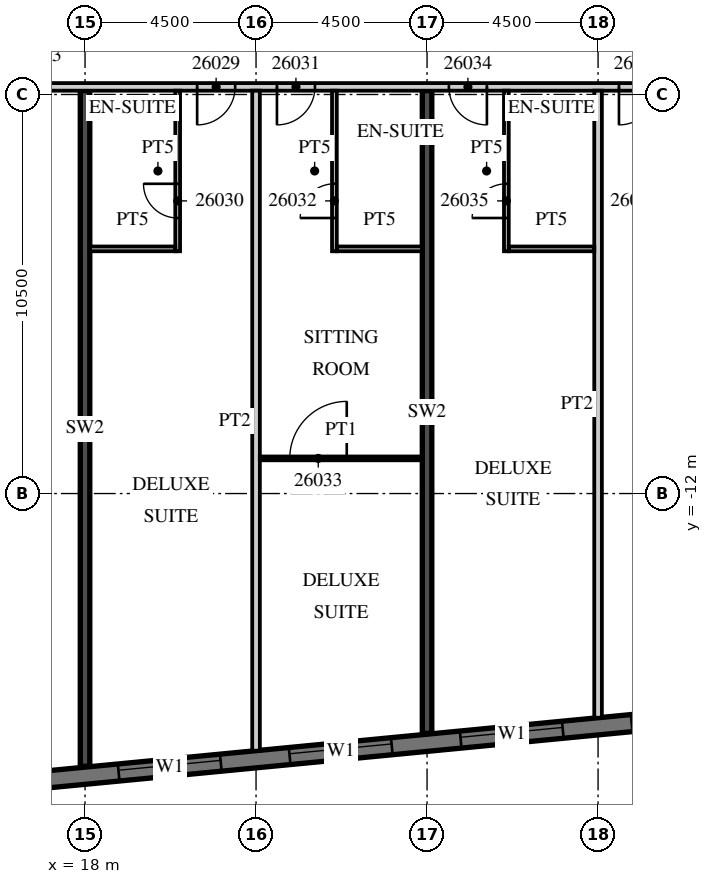
"""IFC4 building model, lengths in metres.
Left out: names, types, materials, properties, quantities, classifications, styles, units other than length and angle.
Written with IfcOpenShell. Run it as: python <this file> out.ifc"""

import sys

from ifc_helpers import new_model, si_unit, direction, frame, frame_2d, origin, place, context, subcontext, project, spatial, rectangle, extrude, element, fill, save


model = new_model("IFC4")
c1 = context("Model", 3, precision=1e-05, world=origin(), true_north=direction((0.0, 1.0)))
c2 = subcontext(c1, "Body", "Model", "MODEL_VIEW")
j1 = project(units=[si_unit("LENGTHUNIT", "METRE"), si_unit("PLANEANGLEUNIT", "RADIAN")], contexts=[c1])
p1 = place(None, origin())
s1 = spatial("IfcSite", under=j1, at=p1, CompositionType="ELEMENT")
p2 = place(p1, origin())
s2 = spatial("IfcBuilding", under=s1, at=p2, CompositionType="ELEMENT")
p3 = place(p2, frame((0.0, 0.0, 120.7)))
s3 = spatial("IfcBuildingStorey", under=s2, at=p3, CompositionType="ELEMENT", Elevation=120.7)
p4 = place(p3, frame((18.0, -19.177, 0.0), z_axis=(0.0, 0.0, 1.0), x_axis=(0.0, 1.0, 0.0)))
e1 = element("IfcWall", 1, at=p4, inside=s3, PredefinedType="SHEAR", context=c2, shape_type="SweptSolid", body=[
    extrude(rectangle(XDim=17.777, YDim=0.25, at=frame_2d((8.889, 0.0))), origin(), (0.0, 0.0, 1.0), 3.3),
])
p5 = place(p3, frame((27.0, -18.311, 0.0), z_axis=(0.0, 0.0, 1.0), x_axis=(0.0, 1.0, 0.0)))
e2 = element("IfcWall", 2, at=p5, inside=s3, PredefinedType="SHEAR", context=c2, shape_type="SweptSolid", body=[
    extrude(rectangle(XDim=16.911, YDim=0.25, at=frame_2d((8.455, 0.0))), origin(), (0.0, 0.0, 1.0), 3.3),
])
p6 = place(p3, frame((-13.521, -22.46, 0.0), z_axis=(0.0, 0.0, 1.0), x_axis=(0.995396096335, 0.095846812164, 0.0)))
e3 = element("IfcWall", 3, at=p6, inside=s3, PredefinedType="SOLIDWALL", context=c2, shape_type="SweptSolid", body=[
    extrude(rectangle(XDim=59.151, YDim=0.45, at=frame_2d((29.575, 0.0))), origin(), (0.0, 0.0, 1.0), 3.02),
])
p7 = place(p6, frame((0.91, 0.0, 0.45)))
e4 = element("IfcOpeningElement", 4, at=p7, cuts=e3, PredefinedType="OPENING", context=c2, shape_type="SweptSolid", body=[
    extrude(rectangle(XDim=2.7, YDim=2.25, at=frame_2d((1.35, 1.125))), frame((0.0, 0.235, 0.0), z_axis=(0.0, -1.0, 0.0), x_axis=(1.0, 0.0, 0.0)), (0.0, 0.0, 1.0), 0.47),
])
p8 = place(p6, frame((5.431, 0.0, 0.45)))
e5 = element("IfcOpeningElement", 5, at=p8, cuts=e3, PredefinedType="OPENING", context=c2, shape_type="SweptSolid", body=[
    extrude(rectangle(XDim=2.7, YDim=2.25, at=frame_2d((1.35, 1.125))), frame((0.0, 0.235, 0.0), z_axis=(0.0, -1.0, 0.0), x_axis=(1.0, 0.0, 0.0)), (0.0, 0.0, 1.0), 0.47),
])
p9 = place(p6, frame((9.952, 0.0, 0.45)))
e6 = element("IfcOpeningElement", 6, at=p9, cuts=e3, PredefinedType="OPENING", context=c2, shape_type="SweptSolid", body=[
    extrude(rectangle(XDim=2.7, YDim=2.25, at=frame_2d((1.35, 1.125))), frame((0.0, 0.235, 0.0), z_axis=(0.0, -1.0, 0.0), x_axis=(1.0, 0.0, 0.0)), (0.0, 0.0, 1.0), 0.47),
])
p10 = place(p6, frame((14.473, 0.0, 0.45)))
e7 = element("IfcOpeningElement", 7, at=p10, cuts=e3, PredefinedType="OPENING", context=c2, shape_type="SweptSolid", body=[
    extrude(rectangle(XDim=2.7, YDim=2.25, at=frame_2d((1.35, 1.125))), frame((0.0, 0.235, 0.0), z_axis=(0.0, -1.0, 0.0), x_axis=(1.0, 0.0, 0.0)), (0.0, 0.0, 1.0), 0.47),
])
p11 = place(p6, frame((18.994, 0.0, 0.45)))
e8 = element("IfcOpeningElement", 8, at=p11, cuts=e3, PredefinedType="OPENING", context=c2, shape_type="SweptSolid", body=[
    extrude(rectangle(XDim=2.7, YDim=2.25, at=frame_2d((1.35, 1.125))), frame((0.0, 0.235, 0.0), z_axis=(0.0, -1.0, 0.0), x_axis=(1.0, 0.0, 0.0)), (0.0, 0.0, 1.0), 0.47),
])
p12 = place(p6, frame((23.514, 0.0, 0.45)))
e9 = element("IfcOpeningElement", 9, at=p12, cuts=e3, PredefinedType="OPENING", context=c2, shape_type="SweptSolid", body=[
    extrude(rectangle(XDim=2.7, YDim=2.25, at=frame_2d((1.35, 1.125))), frame((0.0, 0.235, 0.0), z_axis=(0.0, -1.0, 0.0), x_axis=(1.0, 0.0, 0.0)), (0.0, 0.0, 1.0), 0.47),
])
p13 = place(p6, frame((28.035, 0.0, 0.45)))
e10 = element("IfcOpeningElement", 10, at=p13, cuts=e3, PredefinedType="OPENING", context=c2, shape_type="SweptSolid", body=[
    extrude(rectangle(XDim=2.7, YDim=2.25, at=frame_2d((1.35, 1.125))), frame((0.0, 0.235, 0.0), z_axis=(0.0, -1.0, 0.0), x_axis=(1.0, 0.0, 0.0)), (0.0, 0.0, 1.0), 0.47),
])
p14 = place(p6, frame((32.556, 0.0, 0.45)))
e11 = element("IfcOpeningElement", 11, at=p14, cuts=e3, PredefinedType="OPENING", context=c2, shape_type="SweptSolid", body=[
    extrude(rectangle(XDim=2.7, YDim=2.25, at=frame_2d((1.35, 1.125))), frame((0.0, 0.235, 0.0), z_axis=(0.0, -1.0, 0.0), x_axis=(1.0, 0.0, 0.0)), (0.0, 0.0, 1.0), 0.47),
])
p15 = place(p6, frame((37.077, 0.0, 0.45)))
e12 = element("IfcOpeningElement", 12, at=p15, cuts=e3, PredefinedType="OPENING", context=c2, shape_type="SweptSolid", body=[
    extrude(rectangle(XDim=2.7, YDim=2.25, at=frame_2d((1.35, 1.125))), frame((0.0, 0.235, 0.0), z_axis=(0.0, -1.0, 0.0), x_axis=(1.0, 0.0, 0.0)), (0.0, 0.0, 1.0), 0.47),
])
p16 = place(p6, frame((41.598, 0.0, 0.45)))
e13 = element("IfcOpeningElement", 13, at=p16, cuts=e3, PredefinedType="OPENING", context=c2, shape_type="SweptSolid", body=[
    extrude(rectangle(XDim=2.7, YDim=2.25, at=frame_2d((1.35, 1.125))), frame((0.0, 0.235, 0.0), z_axis=(0.0, -1.0, 0.0), x_axis=(1.0, 0.0, 0.0)), (0.0, 0.0, 1.0), 0.47),
])
p17 = place(p6, frame((46.118, 0.0, 0.45)))
e14 = element("IfcOpeningElement", 14, at=p17, cuts=e3, PredefinedType="OPENING", context=c2, shape_type="SweptSolid", body=[
    extrude(rectangle(XDim=2.7, YDim=2.25, at=frame_2d((1.35, 1.125))), frame((0.0, 0.235, 0.0), z_axis=(0.0, -1.0, 0.0), x_axis=(1.0, 0.0, 0.0)), (0.0, 0.0, 1.0), 0.47),
])
p18 = place(p6, frame((50.639, 0.0, 0.45)))
e15 = element("IfcOpeningElement", 15, at=p18, cuts=e3, PredefinedType="OPENING", context=c2, shape_type="SweptSolid", body=[
    extrude(rectangle(XDim=2.7, YDim=2.25, at=frame_2d((1.35, 1.125))), frame((0.0, 0.235, 0.0), z_axis=(0.0, -1.0, 0.0), x_axis=(1.0, 0.0, 0.0)), (0.0, 0.0, 1.0), 0.47),
])
p19 = place(p6, frame((55.15, 0.0, 0.45)))
e16 = element("IfcOpeningElement", 16, at=p19, cuts=e3, PredefinedType="OPENING", context=c2, shape_type="SweptSolid", body=[
    extrude(rectangle(XDim=2.7, YDim=2.25, at=frame_2d((1.35, 1.125))), frame((0.0, 0.235, 0.0), z_axis=(0.0, -1.0, 0.0), x_axis=(1.0, 0.0, 0.0)), (0.0, 0.0, 1.0), 0.47),
])
p20 = place(p3, frame((-13.5, -1.3, 0.0), z_axis=(0.0, 0.0, 1.0), x_axis=(1.0, 0.0, 0.0)))
e17 = element("IfcWall", 17, at=p20, inside=s3, PredefinedType="PARTITIONING", context=c2, shape_type="SweptSolid", body=[
    extrude(rectangle(XDim=60.932, YDim=0.2, at=frame_2d((30.466, 0.0))), origin(), (0.0, 0.0, 1.0), 3.02),
])
p21 = place(p20, frame((2.925, 0.0, 0.0)))
e18 = element("IfcOpeningElement", 18, at=p21, cuts=e17, PredefinedType="OPENING", context=c2, shape_type="SweptSolid", body=[
    extrude(rectangle(XDim=1.0, YDim=2.1, at=frame_2d((0.5, 1.05))), frame((0.0, 0.11, 0.0), z_axis=(0.0, -1.0, 0.0), x_axis=(1.0, 0.0, 0.0)), (0.0, 0.0, 1.0), 0.22),
])
p22 = place(p20, frame((9.863, 0.0, 0.0)))
e19 = element("IfcOpeningElement", 19, at=p22, cuts=e17, PredefinedType="OPENING", context=c2, shape_type="SweptSolid", body=[
    extrude(rectangle(XDim=1.2, YDim=2.1, at=frame_2d((0.6, 1.05))), frame((0.0, 0.11, 0.0), z_axis=(0.0, -1.0, 0.0), x_axis=(1.0, 0.0, 0.0)), (0.0, 0.0, 1.0), 0.22),
])
p23 = place(p20, frame((15.938, 0.0, 0.0)))
e20 = element("IfcOpeningElement", 20, at=p23, cuts=e17, PredefinedType="OPENING", context=c2, shape_type="SweptSolid", body=[
    extrude(rectangle(XDim=1.2, YDim=2.1, at=frame_2d((0.6, 1.05))), frame((0.0, 0.11, 0.0), z_axis=(0.0, -1.0, 0.0), x_axis=(1.0, 0.0, 0.0)), (0.0, 0.0, 1.0), 0.22),
])
p24 = place(p20, frame((27.862, 0.0, 0.0)))
e21 = element("IfcOpeningElement", 21, at=p24, cuts=e17, PredefinedType="OPENING", context=c2, shape_type="SweptSolid", body=[
    extrude(rectangle(XDim=1.2, YDim=2.1, at=frame_2d((0.6, 1.05))), frame((0.0, 0.11, 0.0), z_axis=(0.0, -1.0, 0.0), x_axis=(1.0, 0.0, 0.0)), (0.0, 0.0, 1.0), 0.22),
])
p25 = place(p20, frame((34.45, 0.0, 0.0)))
e22 = element("IfcOpeningElement", 22, at=p25, cuts=e17, PredefinedType="OPENING", context=c2, shape_type="SweptSolid", body=[
    extrude(rectangle(XDim=1.0, YDim=2.1, at=frame_2d((0.5, 1.05))), frame((0.0, 0.11, 0.0), z_axis=(0.0, -1.0, 0.0), x_axis=(1.0, 0.0, 0.0)), (0.0, 0.0, 1.0), 0.22),
])
p26 = place(p20, frame((36.55, 0.0, 0.0)))
e23 = element("IfcOpeningElement", 23, at=p26, cuts=e17, PredefinedType="OPENING", context=c2, shape_type="SweptSolid", body=[
    extrude(rectangle(XDim=1.0, YDim=2.1, at=frame_2d((0.5, 1.05))), frame((0.0, 0.11, 0.0), z_axis=(0.0, -1.0, 0.0), x_axis=(1.0, 0.0, 0.0)), (0.0, 0.0, 1.0), 0.22),
])
p27 = place(p20, frame((41.075, 0.0, 0.0)))
e24 = element("IfcOpeningElement", 24, at=p27, cuts=e17, PredefinedType="OPENING", context=c2, shape_type="SweptSolid", body=[
    extrude(rectangle(XDim=1.0, YDim=2.1, at=frame_2d((0.5, 1.05))), frame((0.0, 0.11, 0.0), z_axis=(0.0, -1.0, 0.0), x_axis=(1.0, 0.0, 0.0)), (0.0, 0.0, 1.0), 0.22),
])
p28 = place(p20, frame((45.55, 0.0, 0.0)))
e25 = element("IfcOpeningElement", 25, at=p28, cuts=e17, PredefinedType="OPENING", context=c2, shape_type="SweptSolid", body=[
    extrude(rectangle(XDim=1.0, YDim=2.1, at=frame_2d((0.5, 1.05))), frame((0.0, 0.11, 0.0), z_axis=(0.0, -1.0, 0.0), x_axis=(1.0, 0.0, 0.0)), (0.0, 0.0, 1.0), 0.22),
])
p29 = place(p20, frame((50.075, 0.0, 0.0)))
e26 = element("IfcOpeningElement", 26, at=p29, cuts=e17, PredefinedType="OPENING", context=c2, shape_type="SweptSolid", body=[
    extrude(rectangle(XDim=1.0, YDim=2.1, at=frame_2d((0.5, 1.05))), frame((0.0, 0.11, 0.0), z_axis=(0.0, -1.0, 0.0), x_axis=(1.0, 0.0, 0.0)), (0.0, 0.0, 1.0), 0.22),
])
p30 = place(p20, frame((54.575, 0.0, 0.0)))
e27 = element("IfcOpeningElement", 27, at=p30, cuts=e17, PredefinedType="OPENING", context=c2, shape_type="SweptSolid", body=[
    extrude(rectangle(XDim=1.0, YDim=2.1, at=frame_2d((0.5, 1.05))), frame((0.0, 0.11, 0.0), z_axis=(0.0, -1.0, 0.0), x_axis=(1.0, 0.0, 0.0)), (0.0, 0.0, 1.0), 0.22),
])
p31 = place(p20, frame((59.882, 0.0, 0.0)))
e28 = element("IfcOpeningElement", 28, at=p31, cuts=e17, PredefinedType="OPENING", context=c2, shape_type="SweptSolid", body=[
    extrude(rectangle(XDim=0.9, YDim=2.1, at=frame_2d((0.45, 1.05))), frame((0.0, 0.11, 0.0), z_axis=(0.0, -1.0, 0.0), x_axis=(1.0, 0.0, 0.0)), (0.0, 0.0, 1.0), 0.22),
])
p32 = place(p3, frame((22.5, -18.766, 0.0), z_axis=(0.0, 0.0, 1.0), x_axis=(0.0, 1.0, 0.0)))
e29 = element("IfcWall", 29, at=p32, inside=s3, PredefinedType="PARTITIONING", context=c2, shape_type="SweptSolid", body=[
    extrude(rectangle(XDim=17.366, YDim=0.2, at=frame_2d((8.683, 0.0))), origin(), (0.0, 0.0, 1.0), 3.02),
])
p33 = place(p3, frame((20.438, -5.625, 0.0), z_axis=(0.0, 0.0, 1.0), x_axis=(0.0, 1.0, 0.0)))
e30 = element("IfcWall", 30, at=p33, inside=s3, PredefinedType="PARTITIONING", context=c2, shape_type="SweptSolid", body=[
    extrude(rectangle(XDim=4.225, YDim=0.125, at=frame_2d((2.113, 0.0))), origin(), (0.0, 0.0, 1.0), 3.02),
])
p34 = place(p33, frame((0.875, 0.0, 0.0)))
e31 = element("IfcOpeningElement", 31, at=p34, cuts=e30, PredefinedType="OPENING", context=c2, shape_type="SweptSolid", body=[
    extrude(rectangle(XDim=0.9, YDim=2.1, at=frame_2d((0.45, 1.05))), frame((0.0, 0.073, 0.0), z_axis=(0.0, -1.0, 0.0), x_axis=(1.0, 0.0, 0.0)), (0.0, 0.0, 1.0), 0.145),
])
p35 = place(p3, frame((18.125, -5.562, 0.0), z_axis=(0.0, 0.0, 1.0), x_axis=(1.0, 0.0, 0.0)))
e32 = element("IfcWall", 32, at=p35, inside=s3, PredefinedType="PARTITIONING", context=c2, shape_type="SweptSolid", body=[
    extrude(rectangle(XDim=2.25, YDim=0.125, at=frame_2d((1.125, 0.0))), origin(), (0.0, 0.0, 1.0), 3.02),
])
p36 = place(p3, frame((24.562, -5.625, 0.0), z_axis=(0.0, 0.0, 1.0), x_axis=(0.0, 1.0, 0.0)))
e33 = element("IfcWall", 33, at=p36, inside=s3, PredefinedType="PARTITIONING", context=c2, shape_type="SweptSolid", body=[
    extrude(rectangle(XDim=4.225, YDim=0.125, at=frame_2d((2.113, 0.0))), origin(), (0.0, 0.0, 1.0), 3.02),
])
p37 = place(p36, frame((0.875, 0.0, 0.0)))
e34 = element("IfcOpeningElement", 34, at=p37, cuts=e33, PredefinedType="OPENING", context=c2, shape_type="SweptSolid", body=[
    extrude(rectangle(XDim=0.9, YDim=2.1, at=frame_2d((0.45, 1.05))), frame((0.0, 0.073, 0.0), z_axis=(0.0, -1.0, 0.0), x_axis=(1.0, 0.0, 0.0)), (0.0, 0.0, 1.0), 0.145),
])
p38 = place(p3, frame((24.625, -5.562, 0.0), z_axis=(0.0, 0.0, 1.0), x_axis=(1.0, 0.0, 0.0)))
e35 = element("IfcWall", 35, at=p38, inside=s3, PredefinedType="PARTITIONING", context=c2, shape_type="SweptSolid", body=[
    extrude(rectangle(XDim=2.25, YDim=0.125, at=frame_2d((1.125, 0.0))), origin(), (0.0, 0.0, 1.0), 3.02),
])
p39 = place(p3, frame((22.6, -11.075, 0.0), z_axis=(0.0, 0.0, 1.0), x_axis=(1.0, 0.0, 0.0)))
e36 = element("IfcWall", 36, at=p39, inside=s3, PredefinedType="PARTITIONING", context=c2, shape_type="SweptSolid", body=[
    extrude(rectangle(XDim=4.275, YDim=0.1, at=frame_2d((2.137, 0.0))), origin(), (0.0, 0.0, 1.0), 3.02),
])
p40 = place(p39, frame((0.787, 0.0, 0.0)))
e37 = element("IfcOpeningElement", 37, at=p40, cuts=e36, PredefinedType="OPENING", context=c2, shape_type="SweptSolid", body=[
    extrude(rectangle(XDim=1.5, YDim=2.1, at=frame_2d((0.75, 1.05))), frame((0.0, 0.06, 0.0), z_axis=(0.0, -1.0, 0.0), x_axis=(1.0, 0.0, 0.0)), (0.0, 0.0, 1.0), 0.12),
])
p41 = place(p3, frame((31.5, -17.899, 0.0), z_axis=(0.0, 0.0, 1.0), x_axis=(0.0, 1.0, 0.0)))
e38 = element("IfcWall", 38, at=p41, inside=s3, PredefinedType="PARTITIONING", context=c2, shape_type="SweptSolid", body=[
    extrude(rectangle(XDim=16.499, YDim=0.2, at=frame_2d((8.25, 0.0))), origin(), (0.0, 0.0, 1.0), 3.02),
])
p42 = place(p3, frame((29.087, -5.625, 0.0), z_axis=(0.0, 0.0, 1.0), x_axis=(0.0, 1.0, 0.0)))
e39 = element("IfcWall", 39, at=p42, inside=s3, PredefinedType="PARTITIONING", context=c2, shape_type="SweptSolid", body=[
    extrude(rectangle(XDim=4.225, YDim=0.125, at=frame_2d((2.113, 0.0))), origin(), (0.0, 0.0, 1.0), 3.02),
])
p43 = place(p42, frame((0.875, 0.0, 0.0)))
e40 = element("IfcOpeningElement", 40, at=p43, cuts=e39, PredefinedType="OPENING", context=c2, shape_type="SweptSolid", body=[
    extrude(rectangle(XDim=0.9, YDim=2.1, at=frame_2d((0.45, 1.05))), frame((0.0, 0.073, 0.0), z_axis=(0.0, -1.0, 0.0), x_axis=(1.0, 0.0, 0.0)), (0.0, 0.0, 1.0), 0.145),
])
p44 = place(p3, frame((29.15, -5.562, 0.0), z_axis=(0.0, 0.0, 1.0), x_axis=(1.0, 0.0, 0.0)))
e41 = element("IfcWall", 41, at=p44, inside=s3, PredefinedType="PARTITIONING", context=c2, shape_type="SweptSolid", body=[
    extrude(rectangle(XDim=2.25, YDim=0.125, at=frame_2d((1.125, 0.0))), origin(), (0.0, 0.0, 1.0), 3.02),
])
p45 = place(p14, origin())
e42 = element("IfcWindow", 42, at=p45, inside=s3, PartitioningType="SINGLE_PANEL", PredefinedType="WINDOW", context=c2, shape_type="SweptSolid", body=[
    extrude(rectangle(XDim=2.7, YDim=2.25, at=frame_2d((1.35, 1.125))), frame((0.0, 0.09, 0.0), z_axis=(0.0, -1.0, 0.0), x_axis=(1.0, 0.0, 0.0)), (0.0, 0.0, 1.0), 0.06),
])
fill(e11, e42)
p46 = place(p15, origin())
e43 = element("IfcWindow", 43, at=p46, inside=s3, PartitioningType="SINGLE_PANEL", PredefinedType="WINDOW", context=c2, shape_type="SweptSolid", body=[
    extrude(rectangle(XDim=2.7, YDim=2.25, at=frame_2d((1.35, 1.125))), frame((0.0, 0.09, 0.0), z_axis=(0.0, -1.0, 0.0), x_axis=(1.0, 0.0, 0.0)), (0.0, 0.0, 1.0), 0.06),
])
fill(e12, e43)
p47 = place(p16, origin())
e44 = element("IfcWindow", 44, at=p47, inside=s3, PartitioningType="SINGLE_PANEL", PredefinedType="WINDOW", context=c2, shape_type="SweptSolid", body=[
    extrude(rectangle(XDim=2.7, YDim=2.25, at=frame_2d((1.35, 1.125))), frame((0.0, 0.09, 0.0), z_axis=(0.0, -1.0, 0.0), x_axis=(1.0, 0.0, 0.0)), (0.0, 0.0, 1.0), 0.06),
])
fill(e13, e44)
p48 = place(p17, origin())
e45 = element("IfcWindow", 45, at=p48, inside=s3, PartitioningType="SINGLE_PANEL", PredefinedType="WINDOW", context=c2, shape_type="SweptSolid", body=[
    extrude(rectangle(XDim=2.7, YDim=2.25, at=frame_2d((1.35, 1.125))), frame((0.0, 0.09, 0.0), z_axis=(0.0, -1.0, 0.0), x_axis=(1.0, 0.0, 0.0)), (0.0, 0.0, 1.0), 0.06),
])
fill(e14, e45)
p49 = place(p25, origin())
e46 = element("IfcDoor", 46, at=p49, inside=s3, OperationType="SINGLE_SWING_LEFT", PredefinedType="DOOR", context=c2, shape_type="SweptSolid", body=[
    extrude(rectangle(XDim=1.0, YDim=2.1, at=frame_2d((0.5, 1.05))), frame((0.0, 0.025, 0.0), z_axis=(0.0, -1.0, 0.0), x_axis=(1.0, 0.0, 0.0)), (0.0, 0.0, 1.0), 0.05),
])
fill(e22, e46)
p50 = place(p34, origin())
e47 = element("IfcDoor", 47, at=p50, inside=s3, OperationType="SINGLE_SWING_RIGHT", PredefinedType="DOOR", context=c2, shape_type="SweptSolid", body=[
    extrude(rectangle(XDim=0.9, YDim=2.1, at=frame_2d((0.45, 1.05))), frame((0.0, 0.025, 0.0), z_axis=(0.0, -1.0, 0.0), x_axis=(1.0, 0.0, 0.0)), (0.0, 0.0, 1.0), 0.05),
])
fill(e31, e47)
p51 = place(p26, origin())
e48 = element("IfcDoor", 48, at=p51, inside=s3, OperationType="SINGLE_SWING_LEFT", PredefinedType="DOOR", context=c2, shape_type="SweptSolid", body=[
    extrude(rectangle(XDim=1.0, YDim=2.1, at=frame_2d((0.5, 1.05))), frame((0.0, 0.025, 0.0), z_axis=(0.0, -1.0, 0.0), x_axis=(1.0, 0.0, 0.0)), (0.0, 0.0, 1.0), 0.05),
])
fill(e23, e48)
p52 = place(p37, origin())
e49 = element("IfcDoor", 49, at=p52, inside=s3, OperationType="SINGLE_SWING_LEFT", PredefinedType="DOOR", context=c2, shape_type="SweptSolid", body=[
    extrude(rectangle(XDim=0.9, YDim=2.1, at=frame_2d((0.45, 1.05))), frame((0.0, 0.025, 0.0), z_axis=(0.0, -1.0, 0.0), x_axis=(1.0, 0.0, 0.0)), (0.0, 0.0, 1.0), 0.05),
])
fill(e34, e49)
p53 = place(p40, origin())
e50 = element("IfcDoor", 50, at=p53, inside=s3, OperationType="SINGLE_SWING_RIGHT", PredefinedType="DOOR", context=c2, shape_type="SweptSolid", body=[
    extrude(rectangle(XDim=1.5, YDim=2.1, at=frame_2d((0.75, 1.05))), frame((0.0, 0.025, 0.0), z_axis=(0.0, -1.0, 0.0), x_axis=(1.0, 0.0, 0.0)), (0.0, 0.0, 1.0), 0.05),
])
fill(e37, e50)
p54 = place(p27, origin())
e51 = element("IfcDoor", 51, at=p54, inside=s3, OperationType="SINGLE_SWING_RIGHT", PredefinedType="DOOR", context=c2, shape_type="SweptSolid", body=[
    extrude(rectangle(XDim=1.0, YDim=2.1, at=frame_2d((0.5, 1.05))), frame((0.0, 0.025, 0.0), z_axis=(0.0, -1.0, 0.0), x_axis=(1.0, 0.0, 0.0)), (0.0, 0.0, 1.0), 0.05),
])
fill(e24, e51)
p55 = place(p43, origin())
e52 = element("IfcDoor", 52, at=p55, inside=s3, OperationType="SINGLE_SWING_LEFT", PredefinedType="DOOR", context=c2, shape_type="SweptSolid", body=[
    extrude(rectangle(XDim=0.9, YDim=2.1, at=frame_2d((0.45, 1.05))), frame((0.0, 0.025, 0.0), z_axis=(0.0, -1.0, 0.0), x_axis=(1.0, 0.0, 0.0)), (0.0, 0.0, 1.0), 0.05),
])
fill(e40, e52)
p56 = place(p28, origin())
e53 = element("IfcDoor", 53, at=p56, inside=s3, OperationType="SINGLE_SWING_LEFT", PredefinedType="DOOR", context=c2, shape_type="SweptSolid", body=[
    extrude(rectangle(XDim=1.0, YDim=2.1, at=frame_2d((0.5, 1.05))), frame((0.0, 0.025, 0.0), z_axis=(0.0, -1.0, 0.0), x_axis=(1.0, 0.0, 0.0)), (0.0, 0.0, 1.0), 0.05),
])
fill(e25, e53)
save(model, sys.argv[1])
